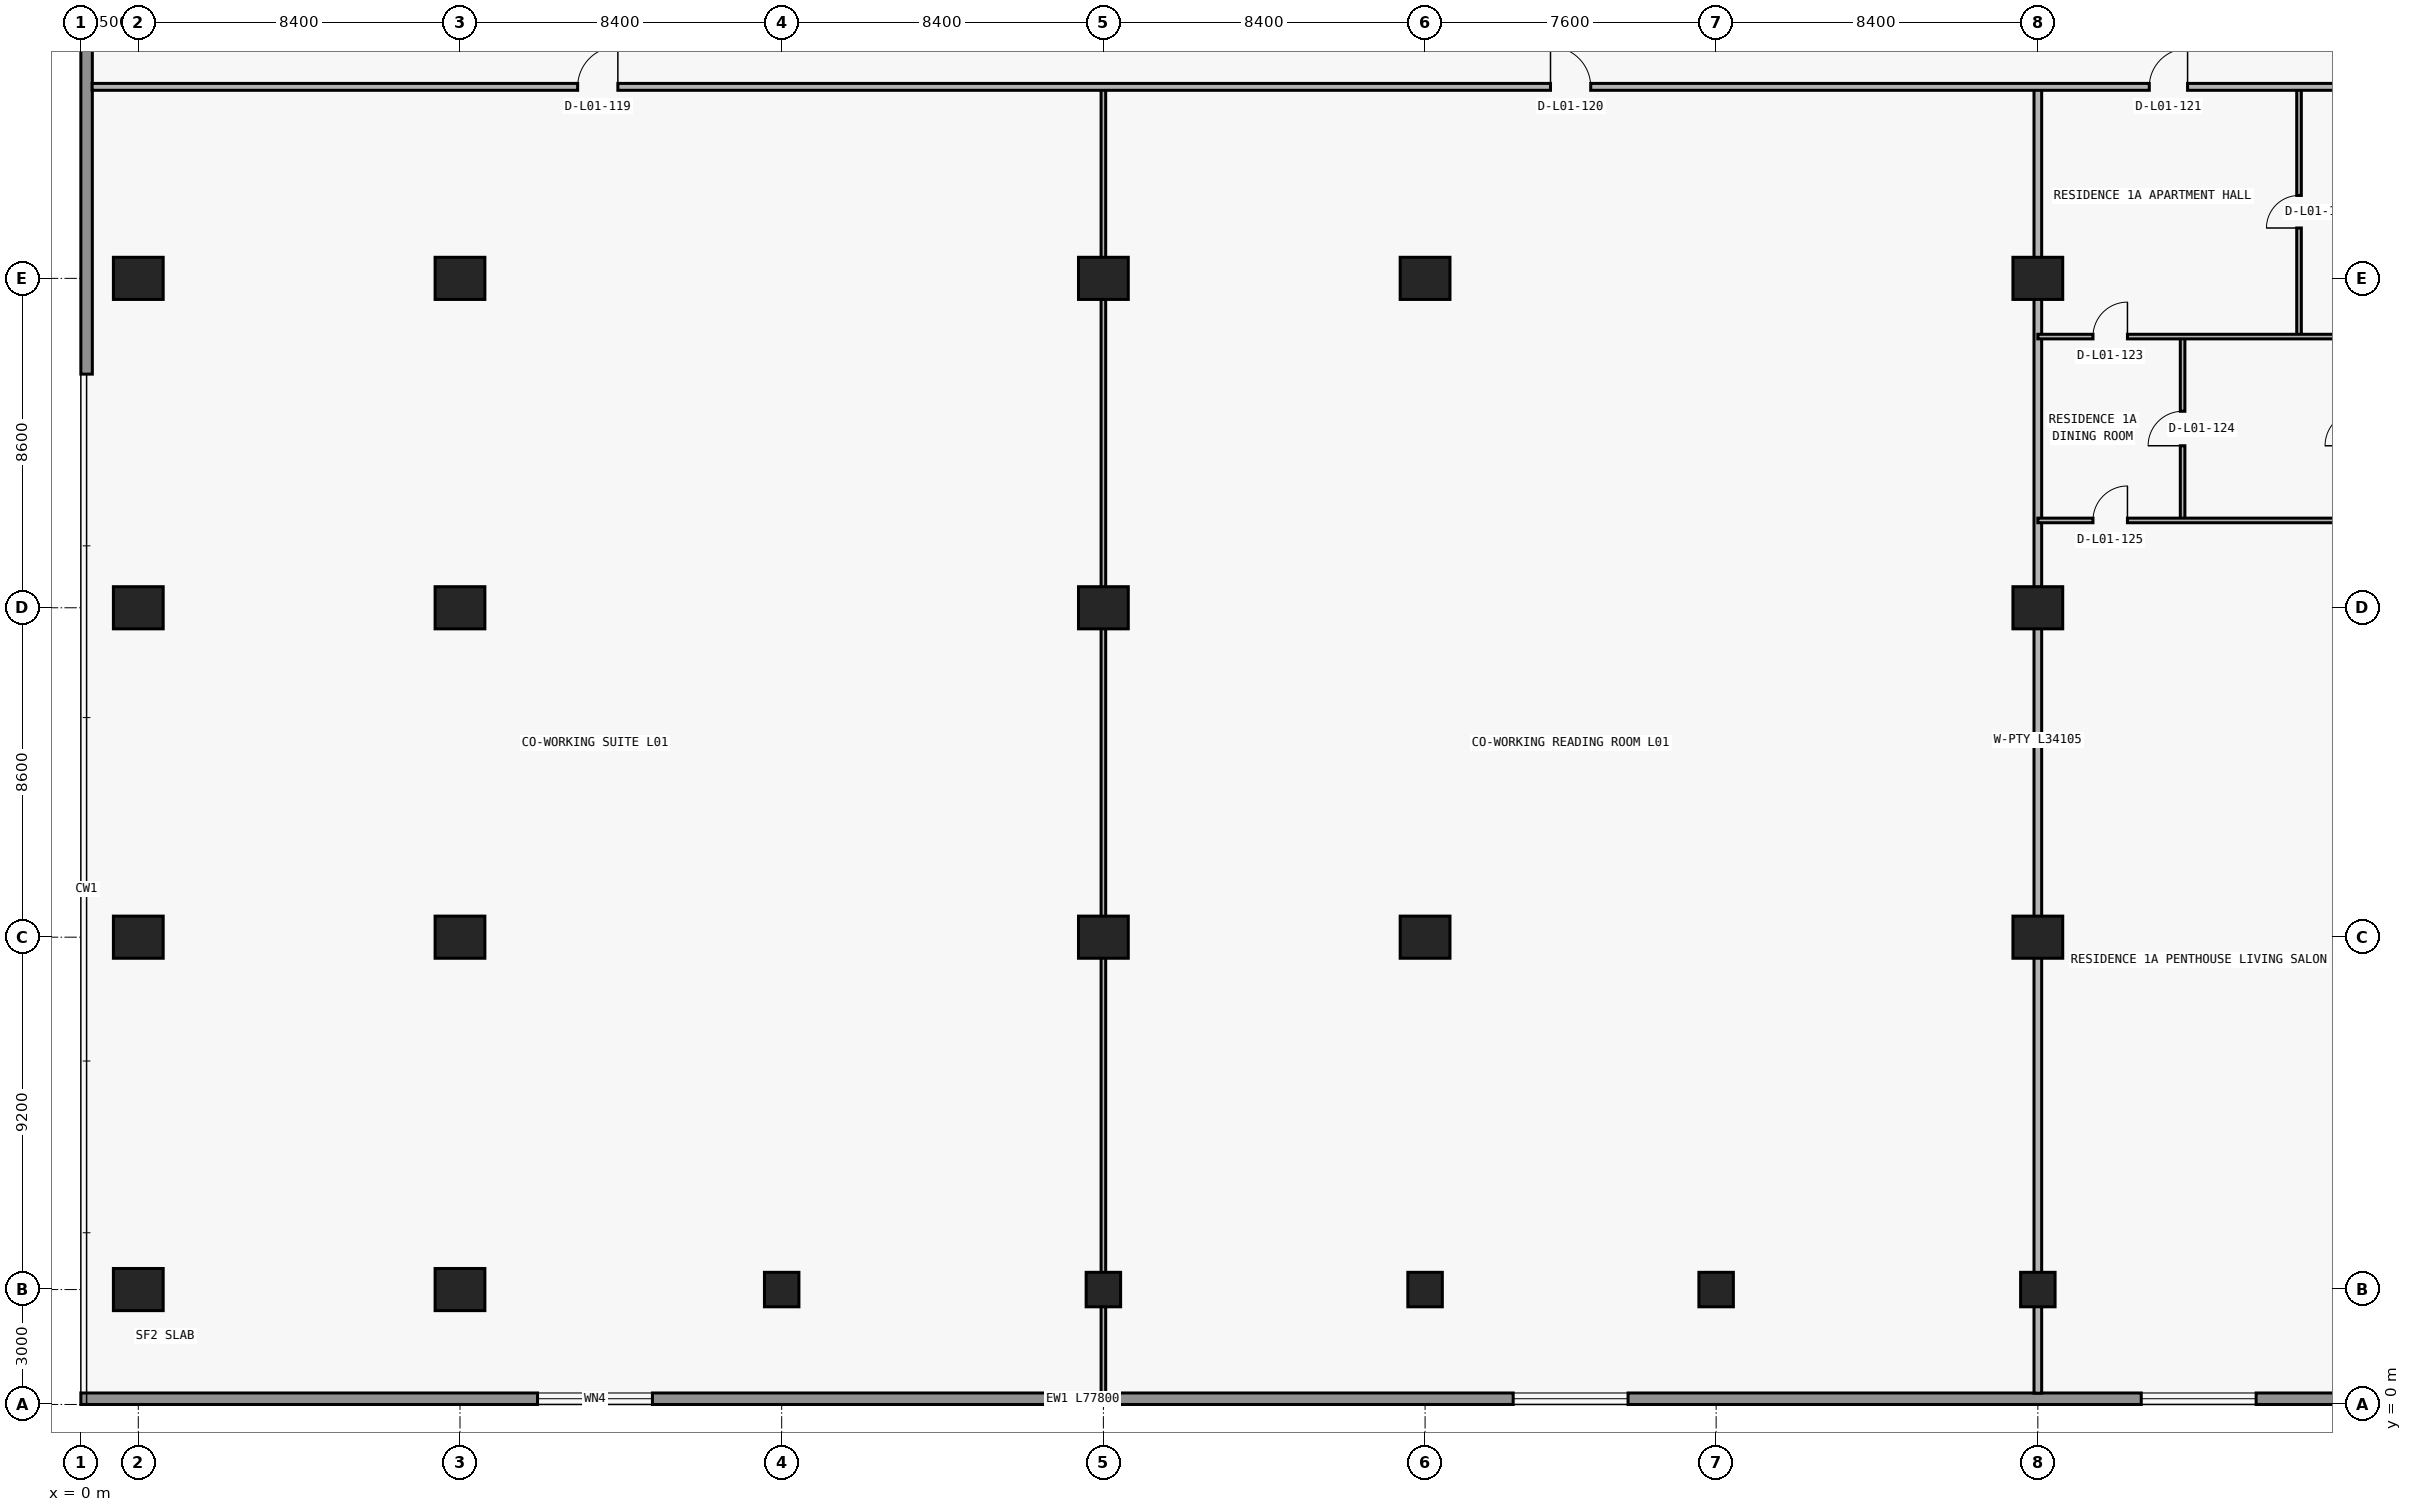
"""IFC4 building model, lengths in metres.
Left out: names, types, materials, properties, quantities, classifications, styles, units other than length and angle.
Written with IfcOpenShell. Run it as: python <this file> out.ifc"""

import sys

from ifc_helpers import new_model, si_unit, direction, frame, frame_2d, origin, origin_2d, place, context, subcontext, project, spatial, rectangle, circle, extrude, element, fill, save


model = new_model("IFC4")
c1 = context("Model", 3, precision=1e-05, world=origin(), true_north=direction((0.0, 1.0)))
c2 = subcontext(c1, "Body", "Model", "MODEL_VIEW")
j1 = project(units=[si_unit("LENGTHUNIT", "METRE"), si_unit("PLANEANGLEUNIT", "RADIAN")], contexts=[c1])
p1 = place(None, origin())
s1 = spatial("IfcSite", under=j1, at=p1, CompositionType="ELEMENT")
p2 = place(p1, origin())
s2 = spatial("IfcBuilding", under=s1, at=p2, CompositionType="ELEMENT")
p3 = place(p2, frame((0.0, 0.0, 5.4)))
s3 = spatial("IfcBuildingStorey", under=s2, at=p3, CompositionType="ELEMENT", Elevation=5.4)
for number, where, z_axis, x_axis in (
    (1, (1.5, 3.0, 0.0), (0.0, 0.0, 1.0), (1.0, 0.0, 0.0)),
    (2, (9.9, 3.0, 0.0), (0.0, 0.0, 1.0), (1.0, 0.0, 0.0)),
):
    element("IfcColumn", number, at=place(p3, frame(where, z_axis=z_axis, x_axis=x_axis)), inside=s3, PredefinedType="COLUMN", context=c2, shape_type="SweptSolid", body=[
        extrude(rectangle(XDim=1.3, YDim=1.1, at=origin_2d()), origin(), (0.0, 0.0, 1.0), 4.5),
    ])
for number, where, z_axis, x_axis in (
    (3, (18.3, 3.0, 0.0), (0.0, 0.0, 1.0), (1.0, 0.0, 0.0)),
    (4, (26.7, 3.0, 0.0), (0.0, 0.0, 1.0), (1.0, 0.0, 0.0)),
    (5, (35.1, 3.0, 0.0), (0.0, 0.0, 1.0), (1.0, 0.0, 0.0)),
    (6, (42.7, 3.0, 0.0), (0.0, 0.0, 1.0), (1.0, 0.0, 0.0)),
    (7, (51.1, 3.0, 0.0), (0.0, 0.0, 1.0), (1.0, 0.0, 0.0)),
):
    element("IfcColumn", number, at=place(p3, frame(where, z_axis=z_axis, x_axis=x_axis)), inside=s3, PredefinedType="COLUMN", context=c2, shape_type="SweptSolid", body=[
        extrude(circle(Radius=0.45, at=origin_2d()), origin(), (0.0, 0.0, 1.0), 4.5),
    ])
for number, where, z_axis, x_axis in (
    (8, (1.5, 12.2, 0.0), (0.0, 0.0, 1.0), (1.0, 0.0, 0.0)),
    (9, (9.9, 12.2, 0.0), (0.0, 0.0, 1.0), (1.0, 0.0, 0.0)),
    (10, (26.7, 12.2, 0.0), (0.0, 0.0, 1.0), (1.0, 0.0, 0.0)),
    (11, (35.1, 12.2, 0.0), (0.0, 0.0, 1.0), (1.0, 0.0, 0.0)),
    (12, (51.1, 12.2, 0.0), (0.0, 0.0, 1.0), (1.0, 0.0, 0.0)),
    (13, (1.5, 20.8, 0.0), (0.0, 0.0, 1.0), (1.0, 0.0, 0.0)),
    (14, (9.9, 20.8, 0.0), (0.0, 0.0, 1.0), (1.0, 0.0, 0.0)),
    (15, (26.7, 20.8, 0.0), (0.0, 0.0, 1.0), (1.0, 0.0, 0.0)),
    (16, (51.1, 20.8, 0.0), (0.0, 0.0, 1.0), (1.0, 0.0, 0.0)),
    (17, (1.5, 29.4, 0.0), (0.0, 0.0, 1.0), (1.0, 0.0, 0.0)),
    (18, (9.9, 29.4, 0.0), (0.0, 0.0, 1.0), (1.0, 0.0, 0.0)),
    (19, (26.7, 29.4, 0.0), (0.0, 0.0, 1.0), (1.0, 0.0, 0.0)),
    (20, (35.1, 29.4, 0.0), (0.0, 0.0, 1.0), (1.0, 0.0, 0.0)),
    (21, (51.1, 29.4, 0.0), (0.0, 0.0, 1.0), (1.0, 0.0, 0.0)),
):
    element("IfcColumn", number, at=place(p3, frame(where, z_axis=z_axis, x_axis=x_axis)), inside=s3, PredefinedType="COLUMN", context=c2, shape_type="SweptSolid", body=[
        extrude(rectangle(XDim=1.3, YDim=1.1, at=origin_2d()), origin(), (0.0, 0.0, 1.0), 4.5),
    ])
p4 = place(p3, frame((77.8, 0.15, 0.0), z_axis=(0.0, 0.0, 1.0), x_axis=(-1.0, 0.0, 0.0)))
e22 = element("IfcWall", 22, at=p4, inside=s3, PredefinedType="STANDARD", context=c2, shape_type="SweptSolid", body=[
    extrude(rectangle(XDim=77.8, YDim=0.3, at=frame_2d((38.9, 0.0))), origin(), (0.0, 0.0, 1.0), 4.5),
])
p5 = place(p4, frame((62.875, 0.0, 0.85)))
e23 = element("IfcOpeningElement", 23, at=p5, cuts=e22, PredefinedType="OPENING", context=c2, shape_type="SweptSolid", body=[
    extrude(rectangle(XDim=3.0, YDim=2.4, at=frame_2d((1.5, 1.2))), frame((0.0, 0.16, 0.0), z_axis=(0.0, -1.0, 0.0), x_axis=(1.0, 0.0, 0.0)), (0.0, 0.0, 1.0), 0.32),
])
p6 = place(p4, frame((37.4, 0.0, 0.85)))
e24 = element("IfcOpeningElement", 24, at=p6, cuts=e22, PredefinedType="OPENING", context=c2, shape_type="SweptSolid", body=[
    extrude(rectangle(XDim=3.0, YDim=2.4, at=frame_2d((1.5, 1.2))), frame((0.0, 0.16, 0.0), z_axis=(0.0, -1.0, 0.0), x_axis=(1.0, 0.0, 0.0)), (0.0, 0.0, 1.0), 0.32),
])
p7 = place(p4, frame((21.0, 0.0, 0.85)))
e25 = element("IfcOpeningElement", 25, at=p7, cuts=e22, PredefinedType="OPENING", context=c2, shape_type="SweptSolid", body=[
    extrude(rectangle(XDim=3.0, YDim=2.4, at=frame_2d((1.5, 1.2))), frame((0.0, 0.16, 0.0), z_axis=(0.0, -1.0, 0.0), x_axis=(1.0, 0.0, 0.0)), (0.0, 0.0, 1.0), 0.32),
])
p8 = place(p4, frame((13.0, 0.0, 0.85)))
e26 = element("IfcOpeningElement", 26, at=p8, cuts=e22, PredefinedType="OPENING", context=c2, shape_type="SweptSolid", body=[
    extrude(rectangle(XDim=2.2, YDim=1.55, at=frame_2d((1.1, 0.775))), frame((0.0, 0.16, 0.0), z_axis=(0.0, -1.0, 0.0), x_axis=(1.0, 0.0, 0.0)), (0.0, 0.0, 1.0), 0.32),
])
p9 = place(p4, frame((3.525, 0.0, 0.85)))
e27 = element("IfcOpeningElement", 27, at=p9, cuts=e22, PredefinedType="OPENING", context=c2, shape_type="SweptSolid", body=[
    extrude(rectangle(XDim=3.0, YDim=2.4, at=frame_2d((1.5, 1.2))), frame((0.0, 0.16, 0.0), z_axis=(0.0, -1.0, 0.0), x_axis=(1.0, 0.0, 0.0)), (0.0, 0.0, 1.0), 0.32),
])
p10 = place(p3, frame((0.15, 26.9, 0.0), z_axis=(0.0, 0.0, 1.0), x_axis=(0.0, 1.0, 0.0)))
e28 = element("IfcWall", 28, at=p10, inside=s3, PredefinedType="STANDARD", context=c2, shape_type="SweptSolid", body=[
    extrude(rectangle(XDim=26.9, YDim=0.3, at=frame_2d((13.45, 0.0))), origin(), (0.0, 0.0, 1.0), 4.5),
])
p11 = place(p3, frame((26.7, 0.295, 0.0), z_axis=(0.0, 0.0, 1.0), x_axis=(0.0, 1.0, 0.0)))
e29 = element("IfcWall", 29, at=p11, inside=s3, PredefinedType="PARTITIONING", context=c2, shape_type="SweptSolid", body=[
    extrude(rectangle(XDim=34.105, YDim=0.12, at=frame_2d((17.052, 0.0))), origin(), (0.0, 0.0, 1.0), 3.464),
])
p12 = place(p3, frame((51.1, 0.295, 0.0), z_axis=(0.0, 0.0, 1.0), x_axis=(0.0, 1.0, 0.0)))
e30 = element("IfcWall", 30, at=p12, inside=s3, PredefinedType="PARTITIONING", context=c2, shape_type="SweptSolid", body=[
    extrude(rectangle(XDim=34.105, YDim=0.2, at=frame_2d((17.052, 0.0))), origin(), (0.0, 0.0, 1.0), 3.464),
])
p13 = place(p3, frame((54.88, 23.08, 0.0), z_axis=(0.0, 0.0, 1.0), x_axis=(0.0, 1.0, 0.0)))
e31 = element("IfcWall", 31, at=p13, inside=s3, PredefinedType="PARTITIONING", context=c2, shape_type="SweptSolid", body=[
    extrude(rectangle(XDim=4.8, YDim=0.12, at=frame_2d((2.4, 0.0))), origin(), (0.0, 0.0, 1.0), 4.5),
])
p14 = place(p13, frame((1.95, 0.0, 0.0)))
e32 = element("IfcOpeningElement", 32, at=p14, cuts=e31, PredefinedType="OPENING", context=c2, shape_type="SweptSolid", body=[
    extrude(rectangle(XDim=0.9, YDim=2.15, at=frame_2d((0.45, 1.075))), frame((0.0, 0.07, 0.0), z_axis=(0.0, -1.0, 0.0), x_axis=(1.0, 0.0, 0.0)), (0.0, 0.0, 1.0), 0.14),
])
p15 = place(p3, frame((57.92, 27.88, 0.0), z_axis=(0.0, 0.0, 1.0), x_axis=(0.0, 1.0, 0.0)))
e33 = element("IfcWall", 33, at=p15, inside=s3, PredefinedType="PARTITIONING", context=c2, shape_type="SweptSolid", body=[
    extrude(rectangle(XDim=6.52, YDim=0.12, at=frame_2d((3.26, 0.0))), origin(), (0.0, 0.0, 1.0), 3.873),
])
p16 = place(p15, frame((2.835, 0.0, 0.0)))
e34 = element("IfcOpeningElement", 34, at=p16, cuts=e33, PredefinedType="OPENING", context=c2, shape_type="SweptSolid", body=[
    extrude(rectangle(XDim=0.85, YDim=2.1, at=frame_2d((0.425, 1.05))), frame((0.0, 0.07, 0.0), z_axis=(0.0, -1.0, 0.0), x_axis=(1.0, 0.0, 0.0)), (0.0, 0.0, 1.0), 0.14),
])
p17 = place(p3, frame((51.1, 23.08, 0.0), z_axis=(0.0, 0.0, 1.0), x_axis=(1.0, 0.0, 0.0)))
e35 = element("IfcWall", 35, at=p17, inside=s3, PredefinedType="PARTITIONING", context=c2, shape_type="SweptSolid", body=[
    extrude(rectangle(XDim=8.4, YDim=0.12, at=frame_2d((4.2, 0.0))), origin(), (0.0, 0.0, 1.0), 4.5),
])
p18 = place(p17, frame((1.44, 0.0, 0.0)))
e36 = element("IfcOpeningElement", 36, at=p18, cuts=e35, PredefinedType="OPENING", context=c2, shape_type="SweptSolid", body=[
    extrude(rectangle(XDim=0.9, YDim=2.15, at=frame_2d((0.45, 1.075))), frame((0.0, 0.07, 0.0), z_axis=(0.0, -1.0, 0.0), x_axis=(1.0, 0.0, 0.0)), (0.0, 0.0, 1.0), 0.14),
])
p19 = place(p3, frame((51.1, 27.88, 0.0), z_axis=(0.0, 0.0, 1.0), x_axis=(1.0, 0.0, 0.0)))
e37 = element("IfcWall", 37, at=p19, inside=s3, PredefinedType="PARTITIONING", context=c2, shape_type="SweptSolid", body=[
    extrude(rectangle(XDim=8.395, YDim=0.12, at=frame_2d((4.198, 0.0))), origin(), (0.0, 0.0, 1.0), 4.5),
])
p20 = place(p19, frame((1.44, 0.0, 0.0)))
e38 = element("IfcOpeningElement", 38, at=p20, cuts=e37, PredefinedType="OPENING", context=c2, shape_type="SweptSolid", body=[
    extrude(rectangle(XDim=0.9, YDim=2.15, at=frame_2d((0.45, 1.075))), frame((0.0, 0.07, 0.0), z_axis=(0.0, -1.0, 0.0), x_axis=(1.0, 0.0, 0.0)), (0.0, 0.0, 1.0), 0.14),
])
p21 = place(p3, frame((0.295, 34.4, 0.0), z_axis=(0.0, 0.0, 1.0), x_axis=(1.0, 0.0, 0.0)))
e39 = element("IfcWall", 39, at=p21, inside=s3, PredefinedType="PARTITIONING", context=c2, shape_type="SweptSolid", body=[
    extrude(rectangle(XDim=77.21, YDim=0.18, at=frame_2d((38.605, 0.0))), origin(), (0.0, 0.0, 1.0), 4.5),
])
p22 = place(p21, frame((12.677, 0.0, 0.0)))
e40 = element("IfcOpeningElement", 40, at=p22, cuts=e39, PredefinedType="OPENING", context=c2, shape_type="SweptSolid", body=[
    extrude(rectangle(XDim=1.05, YDim=2.15, at=frame_2d((0.525, 1.075))), frame((0.0, 0.1, 0.0), z_axis=(0.0, -1.0, 0.0), x_axis=(1.0, 0.0, 0.0)), (0.0, 0.0, 1.0), 0.2),
])
p23 = place(p21, frame((38.08, 0.0, 0.0)))
e41 = element("IfcOpeningElement", 41, at=p23, cuts=e39, PredefinedType="OPENING", context=c2, shape_type="SweptSolid", body=[
    extrude(rectangle(XDim=1.05, YDim=2.15, at=frame_2d((0.525, 1.075))), frame((0.0, 0.1, 0.0), z_axis=(0.0, -1.0, 0.0), x_axis=(1.0, 0.0, 0.0)), (0.0, 0.0, 1.0), 0.2),
])
p24 = place(p21, frame((53.715, 0.0, 0.0)))
e42 = element("IfcOpeningElement", 42, at=p24, cuts=e39, PredefinedType="OPENING", context=c2, shape_type="SweptSolid", body=[
    extrude(rectangle(XDim=1.0, YDim=2.2, at=frame_2d((0.5, 1.1))), frame((0.0, 0.1, 0.0), z_axis=(0.0, -1.0, 0.0), x_axis=(1.0, 0.0, 0.0)), (0.0, 0.0, 1.0), 0.2),
])
p25 = place(p21, frame((71.883, 0.0, 0.0)))
e43 = element("IfcOpeningElement", 43, at=p25, cuts=e39, PredefinedType="OPENING", context=c2, shape_type="SweptSolid", body=[
    extrude(rectangle(XDim=1.05, YDim=2.15, at=frame_2d((0.525, 1.075))), frame((0.0, 0.1, 0.0), z_axis=(0.0, -1.0, 0.0), x_axis=(1.0, 0.0, 0.0)), (0.0, 0.0, 1.0), 0.2),
])
p26 = place(p5, origin())
e44 = element("IfcWindow", 44, at=p26, inside=s3, PartitioningType="SINGLE_PANEL", PredefinedType="WINDOW", context=c2, shape_type="SweptSolid", body=[
    extrude(rectangle(XDim=3.0, YDim=2.4, at=frame_2d((1.5, 1.2))), frame((0.0, 0.03, 0.0), z_axis=(0.0, -1.0, 0.0), x_axis=(1.0, 0.0, 0.0)), (0.0, 0.0, 1.0), 0.06),
])
fill(e23, e44)
p27 = place(p6, origin())
e45 = element("IfcWindow", 45, at=p27, inside=s3, PartitioningType="SINGLE_PANEL", PredefinedType="WINDOW", context=c2, shape_type="SweptSolid", body=[
    extrude(rectangle(XDim=3.0, YDim=2.4, at=frame_2d((1.5, 1.2))), frame((0.0, 0.03, 0.0), z_axis=(0.0, -1.0, 0.0), x_axis=(1.0, 0.0, 0.0)), (0.0, 0.0, 1.0), 0.06),
])
fill(e24, e45)
p28 = place(p7, origin())
e46 = element("IfcWindow", 46, at=p28, inside=s3, PartitioningType="SINGLE_PANEL", PredefinedType="WINDOW", context=c2, shape_type="SweptSolid", body=[
    extrude(rectangle(XDim=3.0, YDim=2.4, at=frame_2d((1.5, 1.2))), frame((0.0, 0.03, 0.0), z_axis=(0.0, -1.0, 0.0), x_axis=(1.0, 0.0, 0.0)), (0.0, 0.0, 1.0), 0.06),
])
fill(e25, e46)
p29 = place(p22, origin())
e47 = element("IfcDoor", 47, at=p29, inside=s3, OperationType="SINGLE_SWING_RIGHT", PredefinedType="DOOR", context=c2, shape_type="SweptSolid", body=[
    extrude(rectangle(XDim=1.05, YDim=2.15, at=frame_2d((0.525, 1.075))), frame((0.0, 0.025, 0.0), z_axis=(0.0, -1.0, 0.0), x_axis=(1.0, 0.0, 0.0)), (0.0, 0.0, 1.0), 0.05),
])
fill(e40, e47)
p30 = place(p23, origin())
e48 = element("IfcDoor", 48, at=p30, inside=s3, OperationType="SINGLE_SWING_LEFT", PredefinedType="DOOR", context=c2, shape_type="SweptSolid", body=[
    extrude(rectangle(XDim=1.05, YDim=2.15, at=frame_2d((0.525, 1.075))), frame((0.0, 0.025, 0.0), z_axis=(0.0, -1.0, 0.0), x_axis=(1.0, 0.0, 0.0)), (0.0, 0.0, 1.0), 0.05),
])
fill(e41, e48)
p31 = place(p24, origin())
e49 = element("IfcDoor", 49, at=p31, inside=s3, OperationType="SINGLE_SWING_RIGHT", PredefinedType="DOOR", context=c2, shape_type="SweptSolid", body=[
    extrude(rectangle(XDim=1.0, YDim=2.2, at=frame_2d((0.5, 1.1))), frame((0.0, 0.025, 0.0), z_axis=(0.0, -1.0, 0.0), x_axis=(1.0, 0.0, 0.0)), (0.0, 0.0, 1.0), 0.05),
])
fill(e42, e49)
p32 = place(p16, origin())
e50 = element("IfcDoor", 50, at=p32, inside=s3, OperationType="SINGLE_SWING_LEFT", PredefinedType="DOOR", context=c2, shape_type="SweptSolid", body=[
    extrude(rectangle(XDim=0.85, YDim=2.1, at=frame_2d((0.425, 1.05))), frame((0.0, 0.025, 0.0), z_axis=(0.0, -1.0, 0.0), x_axis=(1.0, 0.0, 0.0)), (0.0, 0.0, 1.0), 0.05),
])
fill(e34, e50)
p33 = place(p20, origin())
e51 = element("IfcDoor", 51, at=p33, inside=s3, OperationType="SINGLE_SWING_RIGHT", PredefinedType="DOOR", context=c2, shape_type="SweptSolid", body=[
    extrude(rectangle(XDim=0.9, YDim=2.15, at=frame_2d((0.45, 1.075))), frame((0.0, 0.025, 0.0), z_axis=(0.0, -1.0, 0.0), x_axis=(1.0, 0.0, 0.0)), (0.0, 0.0, 1.0), 0.05),
])
fill(e38, e51)
p34 = place(p14, origin())
e52 = element("IfcDoor", 52, at=p34, inside=s3, OperationType="SINGLE_SWING_LEFT", PredefinedType="DOOR", context=c2, shape_type="SweptSolid", body=[
    extrude(rectangle(XDim=0.9, YDim=2.15, at=frame_2d((0.45, 1.075))), frame((0.0, 0.025, 0.0), z_axis=(0.0, -1.0, 0.0), x_axis=(1.0, 0.0, 0.0)), (0.0, 0.0, 1.0), 0.05),
])
fill(e32, e52)
p35 = place(p18, origin())
e53 = element("IfcDoor", 53, at=p35, inside=s3, OperationType="SINGLE_SWING_RIGHT", PredefinedType="DOOR", context=c2, shape_type="SweptSolid", body=[
    extrude(rectangle(XDim=0.9, YDim=2.15, at=frame_2d((0.45, 1.075))), frame((0.0, 0.025, 0.0), z_axis=(0.0, -1.0, 0.0), x_axis=(1.0, 0.0, 0.0)), (0.0, 0.0, 1.0), 0.05),
])
fill(e36, e53)
save(model, sys.argv[1])
